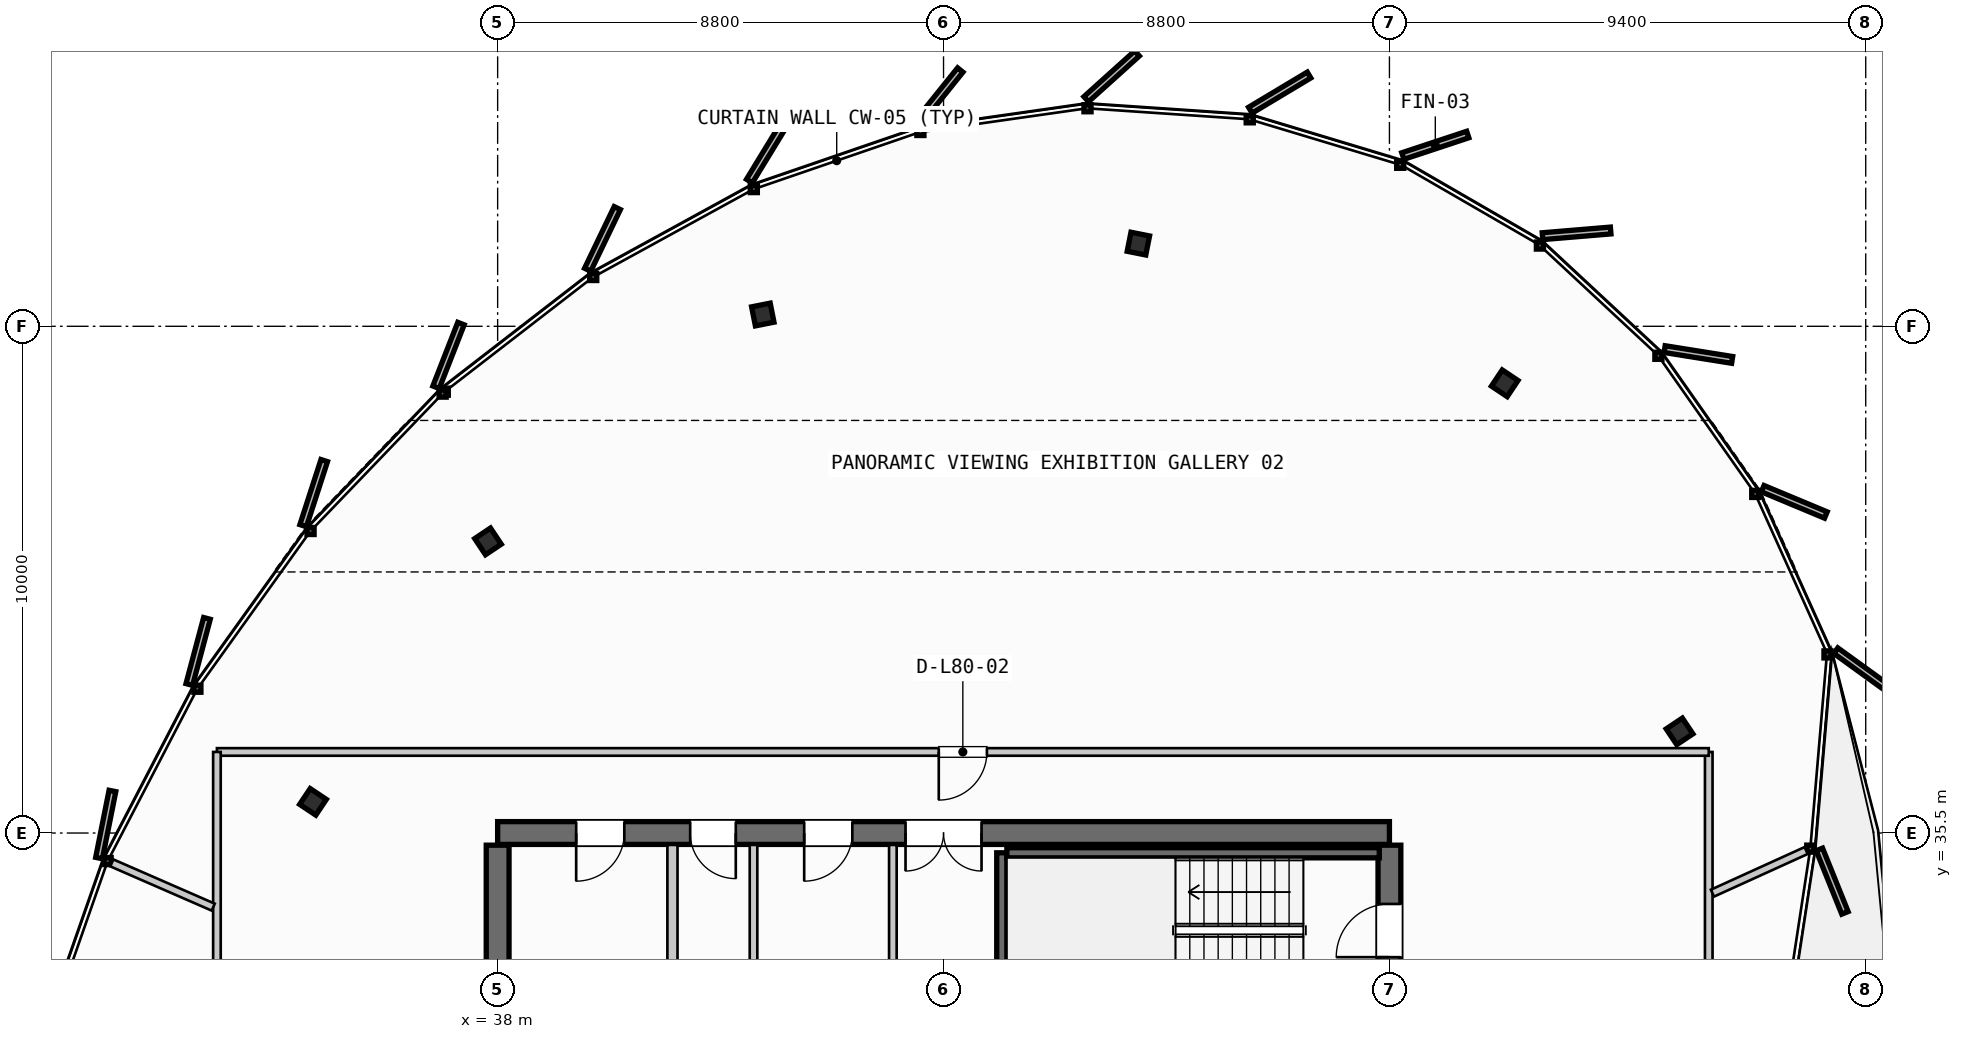
"""IFC4 building model, lengths in metres.
Left out: names, types, materials, properties, quantities, classifications, styles, units other than length and angle.
Written with IfcOpenShell. Run it as: python <this file> out.ifc"""

import sys

from ifc_helpers import new_model, si_unit, direction, frame, frame_2d, origin, origin_2d, place, context, subcontext, project, spatial, rectangle, i_section, extrude, source, transform, mapped, element, fill, save


model = new_model("IFC4")
c1 = context("Model", 3, precision=1e-05, world=origin(), true_north=direction((0.0, 1.0)))
c2 = subcontext(c1, "Body", "Model", "MODEL_VIEW")
j1 = project(units=[si_unit("LENGTHUNIT", "METRE"), si_unit("PLANEANGLEUNIT", "RADIAN")], contexts=[c1])
p1 = place(None, origin())
s1 = spatial("IfcSite", under=j1, at=p1, CompositionType="ELEMENT")
p2 = place(p1, origin())
s2 = spatial("IfcBuilding", under=s1, at=p2, CompositionType="ELEMENT")
p3 = place(p2, frame((0.0, 0.0, 300.85)))
s3 = spatial("IfcBuildingStorey", under=s2, at=p3, CompositionType="ELEMENT", Elevation=300.85)
p4 = place(p3, frame((55.6, 35.5, 0.0), z_axis=(0.0, 0.0, 1.0), x_axis=(-1.0, 0.0, 0.0)))
e1 = element("IfcWall", 1, at=p4, inside=s3, PredefinedType="SHEAR", context=c2, shape_type="SweptSolid", body=[
    extrude(rectangle(XDim=17.6, YDim=0.45, at=frame_2d((8.8, 0.0))), origin(), (0.0, 0.0, 1.0), 3.185),
])
p5 = place(p4, frame((8.05, 0.0, 0.0)))
e2 = element("IfcOpeningElement", 2, at=p5, cuts=e1, PredefinedType="OPENING", context=c2, shape_type="SweptSolid", body=[
    extrude(rectangle(XDim=1.5, YDim=2.2, at=frame_2d((0.75, 1.1))), frame((0.0, 0.235, 0.0), z_axis=(0.0, -1.0, 0.0), x_axis=(1.0, 0.0, 0.0)), (0.0, 0.0, 1.0), 0.47),
])
p6 = place(p4, frame((15.1, 0.0, 0.0)))
e3 = element("IfcOpeningElement", 3, at=p6, cuts=e1, PredefinedType="OPENING", context=c2, shape_type="SweptSolid", body=[
    extrude(rectangle(XDim=0.95, YDim=2.15, at=frame_2d((0.475, 1.075))), frame((0.0, 0.235, 0.0), z_axis=(0.0, -1.0, 0.0), x_axis=(1.0, 0.0, 0.0)), (0.0, 0.0, 1.0), 0.47),
])
p7 = place(p4, frame((12.9, 0.0, 0.0)))
e4 = element("IfcOpeningElement", 4, at=p7, cuts=e1, PredefinedType="OPENING", context=c2, shape_type="SweptSolid", body=[
    extrude(rectangle(XDim=0.9, YDim=2.15, at=frame_2d((0.45, 1.075))), frame((0.0, 0.235, 0.0), z_axis=(0.0, -1.0, 0.0), x_axis=(1.0, 0.0, 0.0)), (0.0, 0.0, 1.0), 0.47),
])
p8 = place(p4, frame((10.6, 0.0, 0.0)))
e5 = element("IfcOpeningElement", 5, at=p8, cuts=e1, PredefinedType="OPENING", context=c2, shape_type="SweptSolid", body=[
    extrude(rectangle(XDim=0.95, YDim=2.15, at=frame_2d((0.475, 1.075))), frame((0.0, 0.235, 0.0), z_axis=(0.0, -1.0, 0.0), x_axis=(1.0, 0.0, 0.0)), (0.0, 0.0, 1.0), 0.47),
])
p9 = place(p3, frame((38.0, 35.26, 0.0), z_axis=(0.0, 0.0, 1.0), x_axis=(0.0, -1.0, 0.0)))
e6 = element("IfcWall", 6, at=p9, inside=s3, PredefinedType="SHEAR", context=c2, shape_type="SweptSolid", body=[
    extrude(rectangle(XDim=14.92, YDim=0.45, at=frame_2d((7.46, 0.0))), origin(), (0.0, 0.0, 1.0), 3.185),
])
p10 = place(p9, frame((5.21, 0.0, 0.0)))
e7 = element("IfcOpeningElement", 7, at=p10, cuts=e6, PredefinedType="OPENING", context=c2, shape_type="SweptSolid", body=[
    extrude(rectangle(XDim=1.1, YDim=2.2, at=frame_2d((0.55, 1.1))), frame((0.0, 0.235, 0.0), z_axis=(0.0, -1.0, 0.0), x_axis=(1.0, 0.0, 0.0)), (0.0, 0.0, 1.0), 0.47),
])
p11 = place(p3, frame((55.6, 20.34, 0.0), z_axis=(0.0, 0.0, 1.0), x_axis=(0.0, 1.0, 0.0)))
e8 = element("IfcWall", 8, at=p11, inside=s3, PredefinedType="SHEAR", context=c2, shape_type="SweptSolid", body=[
    extrude(rectangle(XDim=14.92, YDim=0.45, at=frame_2d((7.46, 0.0))), origin(), (0.0, 0.0, 1.0), 3.185),
])
p12 = place(p11, frame((12.71, 0.0, 0.0)))
e9 = element("IfcOpeningElement", 9, at=p12, cuts=e8, PredefinedType="OPENING", context=c2, shape_type="SweptSolid", body=[
    extrude(rectangle(XDim=1.05, YDim=2.15, at=frame_2d((0.525, 1.075))), frame((0.0, 0.235, 0.0), z_axis=(0.0, -1.0, 0.0), x_axis=(1.0, 0.0, 0.0)), (0.0, 0.0, 1.0), 0.47),
])
p13 = place(p11, frame((8.61, 0.0, 0.0)))
e10 = element("IfcOpeningElement", 10, at=p13, cuts=e8, PredefinedType="OPENING", context=c2, shape_type="SweptSolid", body=[
    extrude(rectangle(XDim=1.1, YDim=2.2, at=frame_2d((0.55, 1.1))), frame((0.0, 0.235, 0.0), z_axis=(0.0, -1.0, 0.0), x_axis=(1.0, 0.0, 0.0)), (0.0, 0.0, 1.0), 0.47),
])
m1 = source(origin(), c2, "Body", "SweptSolid", [
    extrude(i_section(OverallWidth=0.374, OverallDepth=0.383, WebThickness=0.017, FlangeThickness=0.026, FilletRadius=0.015, at=origin_2d()), origin(), (0.0, 0.0, 1.0), 3.185),
])
for number, where, z_axis, x_axis in (
    (11, (61.326, 37.506, 0.0), (0.0, 0.0, 1.0), (0.831, 0.556, 0.0)),
    (12, (57.875, 44.375, 0.0), (0.0, 0.0, 1.0), (0.556, 0.831, 0.0)),
    (13, (50.645, 47.132, 0.0), (0.0, 0.0, 1.0), (0.195, 0.981, 0.0)),
    (14, (43.233, 45.732, 0.0), (0.0, 0.0, 1.0), (-0.195, 0.981, 0.0)),
    (15, (37.81, 41.255, 0.0), (0.0, 0.0, 1.0), (-0.556, 0.831, 0.0)),
    (16, (34.356, 36.115, 0.0), (0.0, 0.0, 1.0), (-0.831, 0.556, 0.0)),
):
    element("IfcColumn", number, at=place(p3, frame(where, z_axis=z_axis, x_axis=x_axis)), inside=s3, PredefinedType="COLUMN", context=c2, shape_type="MappedRepresentation", body=[
        mapped(m1, transform((0.0, 0.0, 0.0), scale=1.0)),
    ])
p14 = place(p3, frame((47.95, 32.05, 0.0), z_axis=(0.0, 0.0, 1.0), x_axis=(0.0, 1.0, 0.0)))
e17 = element("IfcWall", 17, at=p14, inside=s3, PredefinedType="SHEAR", context=c2, shape_type="SweptSolid", body=[
    extrude(rectangle(XDim=3.06, YDim=0.2, at=frame_2d((1.53, 0.0))), origin(), (0.0, 0.0, 1.0), 3.185),
])
p15 = place(p3, frame((48.05, 35.11, 0.0), z_axis=(0.0, 0.0, 1.0), x_axis=(1.0, 0.0, 0.0)))
e18 = element("IfcWall", 18, at=p15, inside=s3, PredefinedType="SHEAR", context=c2, shape_type="SweptSolid", body=[
    extrude(rectangle(XDim=7.35, YDim=0.2, at=frame_2d((3.675, 0.0))), origin(), (0.0, 0.0, 1.0), 3.185),
])
p16 = place(p3, frame((41.45, 31.85, 0.0), z_axis=(0.0, 0.0, 1.0), x_axis=(0.0, 1.0, 0.0)))
e19 = element("IfcWall", 19, at=p16, inside=s3, PredefinedType="PARTITIONING", context=c2, shape_type="SweptSolid", body=[
    extrude(rectangle(XDim=3.415, YDim=0.2, at=frame_2d((1.708, 0.0))), origin(), (0.0, 0.0, 1.0), 2.28),
])
p17 = place(p3, frame((45.8, 31.85, 0.0), z_axis=(0.0, 0.0, 1.0), x_axis=(0.0, 1.0, 0.0)))
e20 = element("IfcWall", 20, at=p17, inside=s3, PredefinedType="PARTITIONING", context=c2, shape_type="SweptSolid", body=[
    extrude(rectangle(XDim=3.415, YDim=0.15, at=frame_2d((1.708, 0.0))), origin(), (0.0, 0.0, 1.0), 2.28),
])
p18 = place(p3, frame((43.05, 31.85, 0.0), z_axis=(0.0, 0.0, 1.0), x_axis=(0.0, 1.0, 0.0)))
e21 = element("IfcWall", 21, at=p18, inside=s3, PredefinedType="PLUMBINGWALL", context=c2, shape_type="SweptSolid", body=[
    extrude(rectangle(XDim=3.415, YDim=0.15, at=frame_2d((1.708, 0.0))), origin(), (0.0, 0.0, 1.0), 2.28),
])
p19 = place(p3, frame((61.902, 18.269, 0.0), z_axis=(0.0, 0.0, 1.0), x_axis=(0.0, 1.0, 0.0)))
e22 = element("IfcWall", 22, at=p19, inside=s3, PredefinedType="PARTITIONING", context=c2, shape_type="SweptSolid", body=[
    extrude(rectangle(XDim=18.831, YDim=0.15, at=frame_2d((9.416, 0.0))), origin(), (0.0, 0.0, 1.0), 2.28),
])
p20 = place(p3, frame((61.902, 37.1, 0.0), z_axis=(0.0, 0.0, 1.0), x_axis=(-1.0, 0.0, 0.0)))
e23 = element("IfcWall", 23, at=p20, inside=s3, PredefinedType="PARTITIONING", context=c2, shape_type="SweptSolid", body=[
    extrude(rectangle(XDim=29.442, YDim=0.15, at=frame_2d((14.721, 0.0))), origin(), (0.0, 0.0, 1.0), 2.28),
])
p21 = place(p20, frame((14.246, 0.0, 0.0)))
e24 = element("IfcOpeningElement", 24, at=p21, cuts=e23, PredefinedType="OPENING", context=c2, shape_type="SweptSolid", body=[
    extrude(rectangle(XDim=0.95, YDim=2.15, at=frame_2d((0.475, 1.075))), frame((0.0, 0.085, 0.0), z_axis=(0.0, -1.0, 0.0), x_axis=(1.0, 0.0, 0.0)), (0.0, 0.0, 1.0), 0.17),
])
p22 = place(p3, frame((32.46, 37.1, 0.0), z_axis=(0.0, 0.0, 1.0), x_axis=(0.0, -1.0, 0.0)))
e25 = element("IfcWall", 25, at=p22, inside=s3, PredefinedType="PARTITIONING", context=c2, shape_type="SweptSolid", body=[
    extrude(rectangle(XDim=18.831, YDim=0.15, at=frame_2d((9.416, 0.0))), origin(), (0.0, 0.0, 1.0), 2.28),
])
p23 = place(p22, frame((10.185, 0.0, 0.0)))
e26 = element("IfcOpeningElement", 26, at=p23, cuts=e25, PredefinedType="OPENING", context=c2, shape_type="SweptSolid", body=[
    extrude(rectangle(XDim=0.95, YDim=2.15, at=frame_2d((0.475, 1.075))), frame((0.0, 0.085, 0.0), z_axis=(0.0, -1.0, 0.0), x_axis=(1.0, 0.0, 0.0)), (0.0, 0.0, 1.0), 0.17),
])
p24 = place(p3, frame((61.975, 34.313, 0.0), z_axis=(0.0, 0.0, 1.0), x_axis=(0.910329433421, 0.413884431512, 0.0)))
e27 = element("IfcWall", 27, at=p24, inside=s3, PredefinedType="PARTITIONING", context=c2, shape_type="SweptSolid", body=[
    extrude(rectangle(XDim=2.031, YDim=0.15, at=frame_2d((1.016, 0.0))), origin(), (0.0, 0.0, 1.0), 2.28),
])
p25 = place(p3, frame((32.387, 34.037, 0.0), z_axis=(0.0, 0.0, 1.0), x_axis=(-0.916516272794, 0.399997402121, 0.0)))
e28 = element("IfcWall", 28, at=p25, inside=s3, PredefinedType="PARTITIONING", context=c2, shape_type="SweptSolid", body=[
    extrude(rectangle(XDim=2.183, YDim=0.15, at=frame_2d((1.092, 0.0))), origin(), (0.0, 0.0, 1.0), 2.28),
])
m2 = source(origin(), c2, "Body", "SweptSolid", [
    extrude(rectangle(XDim=1.05, YDim=2.15, at=frame_2d((0.525, 1.075))), frame((0.0, 0.025, 0.0), z_axis=(0.0, -1.0, 0.0), x_axis=(1.0, 0.0, 0.0)), (0.0, 0.0, 1.0), 0.05),
])
p26 = place(p12, origin())
e29 = element("IfcDoor", 29, at=p26, inside=s3, OperationType="SINGLE_SWING_LEFT", PredefinedType="DOOR", context=c2, shape_type="MappedRepresentation", body=[
    mapped(m2, transform((0.0, 0.0, 0.0), scale=1.0)),
])
fill(e9, e29)
m3 = source(origin(), c2, "Body", "SweptSolid", [
    extrude(rectangle(XDim=1.5, YDim=2.2, at=frame_2d((0.75, 1.1))), frame((0.0, 0.025, 0.0), z_axis=(0.0, -1.0, 0.0), x_axis=(1.0, 0.0, 0.0)), (0.0, 0.0, 1.0), 0.05),
])
p27 = place(p5, origin())
e30 = element("IfcDoor", 30, at=p27, inside=s3, OperationType="DOUBLE_DOOR_SINGLE_SWING", PredefinedType="DOOR", context=c2, shape_type="MappedRepresentation", body=[
    mapped(m3, transform((0.0, 0.0, 0.0), scale=1.0)),
])
fill(e2, e30)
m4 = source(origin(), c2, "Body", "SweptSolid", [
    extrude(rectangle(XDim=0.95, YDim=2.15, at=frame_2d((0.475, 1.075))), frame((0.0, 0.025, 0.0), z_axis=(0.0, -1.0, 0.0), x_axis=(1.0, 0.0, 0.0)), (0.0, 0.0, 1.0), 0.05),
])
p28 = place(p6, origin())
e31 = element("IfcDoor", 31, at=p28, inside=s3, OperationType="SINGLE_SWING_RIGHT", PredefinedType="DOOR", context=c2, shape_type="MappedRepresentation", body=[
    mapped(m4, transform((0.0, 0.0, 0.0), scale=1.0)),
])
fill(e3, e31)
m5 = source(origin(), c2, "Body", "SweptSolid", [
    extrude(rectangle(XDim=0.9, YDim=2.15, at=frame_2d((0.45, 1.075))), frame((0.0, 0.025, 0.0), z_axis=(0.0, -1.0, 0.0), x_axis=(1.0, 0.0, 0.0)), (0.0, 0.0, 1.0), 0.05),
])
p29 = place(p7, origin())
e32 = element("IfcDoor", 32, at=p29, inside=s3, OperationType="SINGLE_SWING_LEFT", PredefinedType="DOOR", context=c2, shape_type="MappedRepresentation", body=[
    mapped(m5, transform((0.0, 0.0, 0.0), scale=1.0)),
])
fill(e4, e32)
p30 = place(p8, origin())
e33 = element("IfcDoor", 33, at=p30, inside=s3, OperationType="SINGLE_SWING_RIGHT", PredefinedType="DOOR", context=c2, shape_type="MappedRepresentation", body=[
    mapped(m4, transform((0.0, 0.0, 0.0), scale=1.0)),
])
fill(e5, e33)
p31 = place(p21, origin())
e34 = element("IfcDoor", 34, at=p31, inside=s3, OperationType="SINGLE_SWING_RIGHT", PredefinedType="DOOR", context=c2, shape_type="MappedRepresentation", body=[
    mapped(m4, transform((0.0, 0.0, 0.0), scale=1.0)),
])
fill(e24, e34)
save(model, sys.argv[1])
